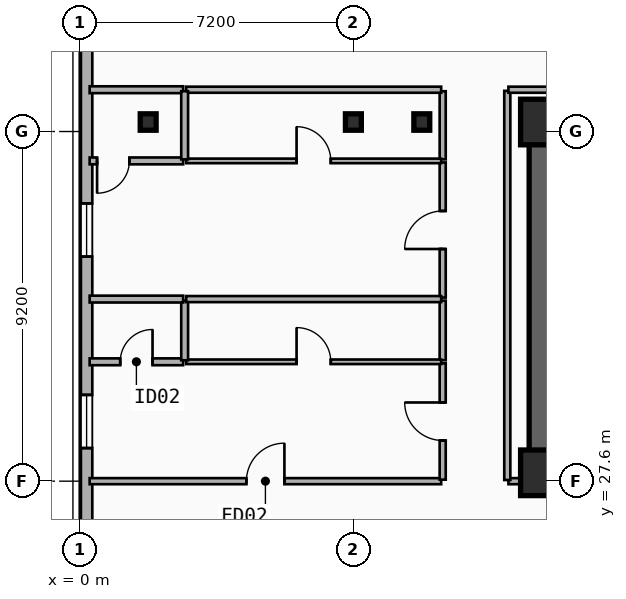
"""IFC4 building model, lengths in metres.
Left out: names, types, materials, properties, quantities, classifications, styles, units other than length and angle.
Written with IfcOpenShell. Run it as: python <this file> out.ifc"""

import sys

from ifc_helpers import new_model, si_unit, direction, frame, frame_2d, origin, origin_2d, place, context, subcontext, project, spatial, rectangle, i_section, extrude, element, fill, save


model = new_model("IFC4")
c1 = context("Model", 3, precision=1e-05, world=origin(), true_north=direction((0.0, 1.0)))
c2 = subcontext(c1, "Body", "Model", "MODEL_VIEW")
j1 = project(units=[si_unit("LENGTHUNIT", "METRE"), si_unit("PLANEANGLEUNIT", "RADIAN")], contexts=[c1])
p1 = place(None, origin())
s1 = spatial("IfcSite", under=j1, at=p1, CompositionType="ELEMENT")
p2 = place(p1, origin())
s2 = spatial("IfcBuilding", under=s1, at=p2, CompositionType="ELEMENT")
p3 = place(p2, frame((0.0, 0.0, 122.3)))
s3 = spatial("IfcBuildingStorey", under=s2, at=p3, CompositionType="ELEMENT", Elevation=122.3)
p4 = place(p3, frame((12.15, 37.05, 0.0), z_axis=(0.0, 0.0, 1.0), x_axis=(1.0, 0.0, 0.0)))
e1 = element("IfcWall", 1, at=p4, inside=s3, PredefinedType="SHEAR", context=c2, shape_type="SweptSolid", body=[
    extrude(rectangle(XDim=33.23, YDim=0.65, at=frame_2d((16.615, 0.0))), origin(), (0.0, 0.0, 1.0), 3.5),
])
p5 = place(p3, frame((21.18, 27.82, 0.0), z_axis=(0.0, 0.0, 1.0), x_axis=(-1.0, 0.0, 0.0)))
e2 = element("IfcWall", 2, at=p5, inside=s3, PredefinedType="SHEAR", context=c2, shape_type="SweptSolid", body=[
    extrude(rectangle(XDim=9.03, YDim=0.65, at=frame_2d((4.515, 0.0))), origin(), (0.0, 0.0, 1.0), 3.5),
])
p6 = place(p5, frame((2.68, 0.0, 0.0)))
e3 = element("IfcOpeningElement", 3, at=p6, cuts=e2, PredefinedType="OPENING", context=c2, shape_type="SweptSolid", body=[
    extrude(rectangle(XDim=1.1, YDim=2.15, at=frame_2d((0.55, 1.075))), frame((0.0, 0.335, 0.0), z_axis=(0.0, -1.0, 0.0), x_axis=(1.0, 0.0, 0.0)), (0.0, 0.0, 1.0), 0.67),
])
p7 = place(p3, frame((12.15, 28.145, 0.0), z_axis=(0.0, 0.0, 1.0), x_axis=(0.0, 1.0, 0.0)))
e4 = element("IfcWall", 4, at=p7, inside=s3, PredefinedType="SHEAR", context=c2, shape_type="SweptSolid", body=[
    extrude(rectangle(XDim=8.58, YDim=0.65, at=frame_2d((4.29, 0.0))), origin(), (0.0, 0.0, 1.0), 3.5),
])
for number, where, z_axis, x_axis in (
    (5, (12.2, 27.82, 0.0), (0.0, 0.0, 1.0), (1.0, 0.0, 0.0)),
    (6, (12.2, 37.05, 0.0), (0.0, 0.0, 1.0), (1.0, 0.0, 0.0)),
):
    element("IfcColumn", number, at=place(p3, frame(where, z_axis=z_axis, x_axis=x_axis)), inside=s3, PredefinedType="COLUMN", context=c2, shape_type="SweptSolid", body=[
        extrude(rectangle(XDim=1.2, YDim=1.2, at=origin_2d()), origin(), (0.0, 0.0, 1.0), 3.5),
    ])
for number, where, z_axis, x_axis in (
    (7, (9.0, 37.05, 0.0), (0.0, 0.0, 1.0), (1.0, 0.0, 0.0)),
    (8, (1.8, 37.05, 0.0), (0.0, 0.0, 1.0), (1.0, 0.0, 0.0)),
    (9, (7.2, 37.05, 0.0), (0.0, 0.0, 1.0), (1.0, 0.0, 0.0)),
):
    element("IfcColumn", number, at=place(p3, frame(where, z_axis=z_axis, x_axis=x_axis)), inside=s3, PredefinedType="COLUMN", context=c2, shape_type="SweptSolid", body=[
        extrude(i_section(OverallWidth=0.418, OverallDepth=0.432, WebThickness=0.035, FlangeThickness=0.056, FilletRadius=0.015, at=origin_2d()), origin(), (0.0, 0.0, 1.0), 3.5),
    ])
p8 = place(p3, frame((0.18, 21.0, 0.0), z_axis=(0.0, 0.0, 1.0), x_axis=(0.0, 1.0, 0.0)))
e10 = element("IfcWall", 10, at=p8, inside=s3, PredefinedType="SOLIDWALL", context=c2, shape_type="SweptSolid", body=[
    extrude(rectangle(XDim=18.0, YDim=0.3, at=frame_2d((9.0, 0.0))), origin(), (0.0, 0.0, 1.0), 3.24),
])
p9 = place(p8, frame((7.47, 0.0, 0.48)))
e11 = element("IfcOpeningElement", 11, at=p9, cuts=e10, PredefinedType="OPENING", context=c2, shape_type="SweptSolid", body=[
    extrude(rectangle(XDim=1.4, YDim=1.8, at=frame_2d((0.7, 0.9))), frame((0.0, 0.16, 0.0), z_axis=(0.0, -1.0, 0.0), x_axis=(1.0, 0.0, 0.0)), (0.0, 0.0, 1.0), 0.32),
])
p10 = place(p8, frame((12.509, 0.0, 0.48)))
e12 = element("IfcOpeningElement", 12, at=p10, cuts=e10, PredefinedType="OPENING", context=c2, shape_type="SweptSolid", body=[
    extrude(rectangle(XDim=1.4, YDim=1.8, at=frame_2d((0.7, 0.9))), frame((0.0, 0.16, 0.0), z_axis=(0.0, -1.0, 0.0), x_axis=(1.0, 0.0, 0.0)), (0.0, 0.0, 1.0), 0.32),
])
p11 = place(p8, frame((0.32, 0.0, 0.65)))
e13 = element("IfcOpeningElement", 13, at=p11, cuts=e10, PredefinedType="OPENING", context=c2, shape_type="SweptSolid", body=[
    extrude(rectangle(XDim=1.4, YDim=1.8, at=frame_2d((0.7, 0.9))), frame((0.0, 0.16, 0.0), z_axis=(0.0, -1.0, 0.0), x_axis=(1.0, 0.0, 0.0)), (0.0, 0.0, 1.0), 0.32),
])
p12 = place(p3, frame((0.26, 27.6, 0.0), z_axis=(0.0, 0.0, 1.0), x_axis=(1.0, 0.0, 0.0)))
e14 = element("IfcWall", 14, at=p12, inside=s3, PredefinedType="PARTITIONING", context=c2, shape_type="SweptSolid", body=[
    extrude(rectangle(XDim=9.25, YDim=0.16, at=frame_2d((4.625, 0.0))), origin(), (0.0, 0.0, 1.0), 2.57),
])
p13 = place(p12, frame((4.125, 0.0, 0.0)))
e15 = element("IfcOpeningElement", 15, at=p13, cuts=e14, PredefinedType="OPENING", context=c2, shape_type="SweptSolid", body=[
    extrude(rectangle(XDim=1.0, YDim=2.15, at=frame_2d((0.5, 1.075))), frame((0.0, 0.09, 0.0), z_axis=(0.0, -1.0, 0.0), x_axis=(1.0, 0.0, 0.0)), (0.0, 0.0, 1.0), 0.18),
])
p14 = place(p3, frame((9.55, 27.64, 0.0), z_axis=(0.0, 0.0, 1.0), x_axis=(0.0, 1.0, 0.0)))
e16 = element("IfcWall", 16, at=p14, inside=s3, PredefinedType="PARTITIONING", context=c2, shape_type="SweptSolid", body=[
    extrude(rectangle(XDim=3.061, YDim=0.16, at=frame_2d((1.531, 0.0))), origin(), (0.0, 0.0, 1.0), 3.24),
])
p15 = place(p14, frame((1.031, 0.0, 0.0)))
e17 = element("IfcOpeningElement", 17, at=p15, cuts=e16, PredefinedType="OPENING", context=c2, shape_type="SweptSolid", body=[
    extrude(rectangle(XDim=1.0, YDim=2.15, at=frame_2d((0.5, 1.075))), frame((0.0, 0.09, 0.0), z_axis=(0.0, -1.0, 0.0), x_axis=(1.0, 0.0, 0.0)), (0.0, 0.0, 1.0), 0.18),
])
p16 = place(p3, frame((9.55, 30.781, 0.0), z_axis=(0.0, 0.0, 1.0), x_axis=(0.0, 1.0, 0.0)))
e18 = element("IfcWall", 18, at=p16, inside=s3, PredefinedType="PARTITIONING", context=c2, shape_type="SweptSolid", body=[
    extrude(rectangle(XDim=1.57, YDim=0.16, at=frame_2d((0.785, 0.0))), origin(), (0.0, 0.0, 1.0), 3.24),
])
p17 = place(p3, frame((9.55, 32.431, 0.0), z_axis=(0.0, 0.0, 1.0), x_axis=(0.0, 1.0, 0.0)))
e19 = element("IfcWall", 19, at=p17, inside=s3, PredefinedType="PARTITIONING", context=c2, shape_type="SweptSolid", body=[
    extrude(rectangle(XDim=3.556, YDim=0.16, at=frame_2d((1.778, 0.0))), origin(), (0.0, 0.0, 1.0), 3.24),
])
p18 = place(p17, frame((1.278, 0.0, 0.0)))
e20 = element("IfcOpeningElement", 20, at=p18, cuts=e19, PredefinedType="OPENING", context=c2, shape_type="SweptSolid", body=[
    extrude(rectangle(XDim=1.0, YDim=2.15, at=frame_2d((0.5, 1.075))), frame((0.0, 0.09, 0.0), z_axis=(0.0, -1.0, 0.0), x_axis=(1.0, 0.0, 0.0)), (0.0, 0.0, 1.0), 0.18),
])
p19 = place(p3, frame((9.55, 36.067, 0.0), z_axis=(0.0, 0.0, 1.0), x_axis=(0.0, 1.0, 0.0)))
e21 = element("IfcWall", 21, at=p19, inside=s3, PredefinedType="PARTITIONING", context=c2, shape_type="SweptSolid", body=[
    extrude(rectangle(XDim=1.793, YDim=0.16, at=frame_2d((0.896, 0.0))), origin(), (0.0, 0.0, 1.0), 2.72),
])
p20 = place(p3, frame((0.26, 37.9, 0.0), z_axis=(0.0, 0.0, 1.0), x_axis=(1.0, 0.0, 0.0)))
e22 = element("IfcWall", 22, at=p20, inside=s3, PredefinedType="PLUMBINGWALL", context=c2, shape_type="SweptSolid", body=[
    extrude(rectangle(XDim=2.46, YDim=0.18, at=frame_2d((1.23, 0.0))), origin(), (0.0, 0.0, 1.0), 3.24),
])
p21 = place(p3, frame((2.8, 37.9, 0.0), z_axis=(0.0, 0.0, 1.0), x_axis=(1.0, 0.0, 0.0)))
e23 = element("IfcWall", 23, at=p21, inside=s3, PredefinedType="PARTITIONING", context=c2, shape_type="SweptSolid", body=[
    extrude(rectangle(XDim=6.71, YDim=0.16, at=frame_2d((3.355, 0.0))), origin(), (0.0, 0.0, 1.0), 3.24),
])
p22 = place(p3, frame((0.26, 30.741, 0.0), z_axis=(0.0, 0.0, 1.0), x_axis=(1.0, 0.0, 0.0)))
e24 = element("IfcWall", 24, at=p22, inside=s3, PredefinedType="PLUMBINGWALL", context=c2, shape_type="SweptSolid", body=[
    extrude(rectangle(XDim=2.46, YDim=0.18, at=frame_2d((1.23, 0.0))), origin(), (0.0, 0.0, 1.0), 2.57),
])
p23 = place(p22, frame((0.805, 0.0, 0.0)))
e25 = element("IfcOpeningElement", 25, at=p23, cuts=e24, PredefinedType="OPENING", context=c2, shape_type="SweptSolid", body=[
    extrude(rectangle(XDim=0.85, YDim=2.1, at=frame_2d((0.425, 1.05))), frame((0.0, 0.1, 0.0), z_axis=(0.0, -1.0, 0.0), x_axis=(1.0, 0.0, 0.0)), (0.0, 0.0, 1.0), 0.2),
])
p24 = place(p3, frame((2.8, 30.741, 0.0), z_axis=(0.0, 0.0, 1.0), x_axis=(1.0, 0.0, 0.0)))
e26 = element("IfcWall", 26, at=p24, inside=s3, PredefinedType="PARTITIONING", context=c2, shape_type="SweptSolid", body=[
    extrude(rectangle(XDim=6.71, YDim=0.12, at=frame_2d((3.355, 0.0))), origin(), (0.0, 0.0, 1.0), 2.57),
])
p25 = place(p24, frame((2.905, 0.0, 0.0)))
e27 = element("IfcOpeningElement", 27, at=p25, cuts=e26, PredefinedType="OPENING", context=c2, shape_type="SweptSolid", body=[
    extrude(rectangle(XDim=0.9, YDim=2.1, at=frame_2d((0.45, 1.05))), frame((0.0, 0.07, 0.0), z_axis=(0.0, -1.0, 0.0), x_axis=(1.0, 0.0, 0.0)), (0.0, 0.0, 1.0), 0.14),
])
p26 = place(p3, frame((2.76, 30.781, 0.0), z_axis=(0.0, 0.0, 1.0), x_axis=(0.0, 1.0, 0.0)))
e28 = element("IfcWall", 28, at=p26, inside=s3, PredefinedType="PLUMBINGWALL", context=c2, shape_type="SweptSolid", body=[
    extrude(rectangle(XDim=1.57, YDim=0.18, at=frame_2d((0.785, 0.0))), origin(), (0.0, 0.0, 1.0), 3.24),
])
p27 = place(p3, frame((0.26, 32.391, 0.0), z_axis=(0.0, 0.0, 1.0), x_axis=(1.0, 0.0, 0.0)))
e29 = element("IfcWall", 29, at=p27, inside=s3, PredefinedType="PLUMBINGWALL", context=c2, shape_type="SweptSolid", body=[
    extrude(rectangle(XDim=2.46, YDim=0.18, at=frame_2d((1.23, 0.0))), origin(), (0.0, 0.0, 1.0), 2.57),
])
p28 = place(p3, frame((2.8, 32.391, 0.0), z_axis=(0.0, 0.0, 1.0), x_axis=(1.0, 0.0, 0.0)))
e30 = element("IfcWall", 30, at=p28, inside=s3, PredefinedType="PARTITIONING", context=c2, shape_type="SweptSolid", body=[
    extrude(rectangle(XDim=6.71, YDim=0.16, at=frame_2d((3.355, 0.0))), origin(), (0.0, 0.0, 1.0), 2.57),
])
p29 = place(p3, frame((2.72, 36.027, 0.0), z_axis=(0.0, 0.0, 1.0), x_axis=(-1.0, 0.0, 0.0)))
e31 = element("IfcWall", 31, at=p29, inside=s3, PredefinedType="PLUMBINGWALL", context=c2, shape_type="SweptSolid", body=[
    extrude(rectangle(XDim=2.46, YDim=0.18, at=frame_2d((1.23, 0.0))), origin(), (0.0, 0.0, 1.0), 2.57),
])
p30 = place(p29, frame((1.415, 0.0, 0.0)))
e32 = element("IfcOpeningElement", 32, at=p30, cuts=e31, PredefinedType="OPENING", context=c2, shape_type="SweptSolid", body=[
    extrude(rectangle(XDim=0.85, YDim=2.1, at=frame_2d((0.425, 1.05))), frame((0.0, 0.1, 0.0), z_axis=(0.0, -1.0, 0.0), x_axis=(1.0, 0.0, 0.0)), (0.0, 0.0, 1.0), 0.2),
])
p31 = place(p3, frame((2.8, 36.027, 0.0), z_axis=(0.0, 0.0, 1.0), x_axis=(1.0, 0.0, 0.0)))
e33 = element("IfcWall", 33, at=p31, inside=s3, PredefinedType="PARTITIONING", context=c2, shape_type="SweptSolid", body=[
    extrude(rectangle(XDim=6.71, YDim=0.12, at=frame_2d((3.355, 0.0))), origin(), (0.0, 0.0, 1.0), 2.57),
])
p32 = place(p31, frame((2.905, 0.0, 0.0)))
e34 = element("IfcOpeningElement", 34, at=p32, cuts=e33, PredefinedType="OPENING", context=c2, shape_type="SweptSolid", body=[
    extrude(rectangle(XDim=0.9, YDim=2.1, at=frame_2d((0.45, 1.05))), frame((0.0, 0.07, 0.0), z_axis=(0.0, -1.0, 0.0), x_axis=(1.0, 0.0, 0.0)), (0.0, 0.0, 1.0), 0.14),
])
p33 = place(p3, frame((2.76, 36.067, 0.0), z_axis=(0.0, 0.0, 1.0), x_axis=(0.0, 1.0, 0.0)))
e35 = element("IfcWall", 35, at=p33, inside=s3, PredefinedType="PLUMBINGWALL", context=c2, shape_type="SweptSolid", body=[
    extrude(rectangle(XDim=1.793, YDim=0.18, at=frame_2d((0.896, 0.0))), origin(), (0.0, 0.0, 1.0), 2.72),
])
p34 = place(p3, frame((11.28, 27.6, 0.0), z_axis=(0.0, 0.0, 1.0), x_axis=(1.0, 0.0, 0.0)))
e36 = element("IfcWall", 36, at=p34, inside=s3, PredefinedType="PARTITIONING", context=c2, shape_type="SweptSolid", body=[
    extrude(rectangle(XDim=0.84, YDim=0.16, at=frame_2d((0.42, 0.0))), origin(), (0.0, 0.0, 1.0), 2.28),
])
p35 = place(p3, frame((11.25, 27.63, 0.0), z_axis=(0.0, 0.0, 1.0), x_axis=(0.0, 1.0, 0.0)))
e37 = element("IfcWall", 37, at=p35, inside=s3, PredefinedType="PARTITIONING", context=c2, shape_type="SweptSolid", body=[
    extrude(rectangle(XDim=10.24, YDim=0.16, at=frame_2d((5.12, 0.0))), origin(), (0.0, 0.0, 1.0), 2.72),
])
p36 = place(p3, frame((11.28, 37.9, 0.0), z_axis=(0.0, 0.0, 1.0), x_axis=(1.0, 0.0, 0.0)))
e38 = element("IfcWall", 38, at=p36, inside=s3, PredefinedType="PARTITIONING", context=c2, shape_type="SweptSolid", body=[
    extrude(rectangle(XDim=35.04, YDim=0.16, at=frame_2d((17.52, 0.0))), origin(), (0.0, 0.0, 1.0), 3.24),
])
p37 = place(p9, origin())
e39 = element("IfcWindow", 39, at=p37, inside=s3, PartitioningType="SINGLE_PANEL", PredefinedType="WINDOW", context=c2, shape_type="SweptSolid", body=[
    extrude(rectangle(XDim=1.4, YDim=1.8, at=frame_2d((0.7, 0.9))), frame((0.0, 0.03, 0.0), z_axis=(0.0, -1.0, 0.0), x_axis=(1.0, 0.0, 0.0)), (0.0, 0.0, 1.0), 0.06),
])
fill(e11, e39)
p38 = place(p10, origin())
e40 = element("IfcWindow", 40, at=p38, inside=s3, PartitioningType="SINGLE_PANEL", PredefinedType="WINDOW", context=c2, shape_type="SweptSolid", body=[
    extrude(rectangle(XDim=1.4, YDim=1.8, at=frame_2d((0.7, 0.9))), frame((0.0, 0.03, 0.0), z_axis=(0.0, -1.0, 0.0), x_axis=(1.0, 0.0, 0.0)), (0.0, 0.0, 1.0), 0.06),
])
fill(e12, e40)
p39 = place(p13, origin())
e41 = element("IfcDoor", 41, at=p39, inside=s3, OperationType="SINGLE_SWING_RIGHT", PredefinedType="DOOR", context=c2, shape_type="SweptSolid", body=[
    extrude(rectangle(XDim=1.0, YDim=2.15, at=frame_2d((0.5, 1.075))), frame((0.0, 0.025, 0.0), z_axis=(0.0, -1.0, 0.0), x_axis=(1.0, 0.0, 0.0)), (0.0, 0.0, 1.0), 0.05),
])
fill(e15, e41)
p40 = place(p15, origin())
e42 = element("IfcDoor", 42, at=p40, inside=s3, OperationType="SINGLE_SWING_RIGHT", PredefinedType="DOOR", context=c2, shape_type="SweptSolid", body=[
    extrude(rectangle(XDim=1.0, YDim=2.15, at=frame_2d((0.5, 1.075))), frame((0.0, 0.025, 0.0), z_axis=(0.0, -1.0, 0.0), x_axis=(1.0, 0.0, 0.0)), (0.0, 0.0, 1.0), 0.05),
])
fill(e17, e42)
p41 = place(p18, origin())
e43 = element("IfcDoor", 43, at=p41, inside=s3, OperationType="SINGLE_SWING_LEFT", PredefinedType="DOOR", context=c2, shape_type="SweptSolid", body=[
    extrude(rectangle(XDim=1.0, YDim=2.15, at=frame_2d((0.5, 1.075))), frame((0.0, 0.025, 0.0), z_axis=(0.0, -1.0, 0.0), x_axis=(1.0, 0.0, 0.0)), (0.0, 0.0, 1.0), 0.05),
])
fill(e20, e43)
p42 = place(p23, origin())
e44 = element("IfcDoor", 44, at=p42, inside=s3, OperationType="SINGLE_SWING_RIGHT", PredefinedType="DOOR", context=c2, shape_type="SweptSolid", body=[
    extrude(rectangle(XDim=0.85, YDim=2.1, at=frame_2d((0.425, 1.05))), frame((0.0, 0.025, 0.0), z_axis=(0.0, -1.0, 0.0), x_axis=(1.0, 0.0, 0.0)), (0.0, 0.0, 1.0), 0.05),
])
fill(e25, e44)
p43 = place(p25, origin())
e45 = element("IfcDoor", 45, at=p43, inside=s3, OperationType="SINGLE_SWING_LEFT", PredefinedType="DOOR", context=c2, shape_type="SweptSolid", body=[
    extrude(rectangle(XDim=0.9, YDim=2.1, at=frame_2d((0.45, 1.05))), frame((0.0, 0.025, 0.0), z_axis=(0.0, -1.0, 0.0), x_axis=(1.0, 0.0, 0.0)), (0.0, 0.0, 1.0), 0.05),
])
fill(e27, e45)
p44 = place(p30, origin())
e46 = element("IfcDoor", 46, at=p44, inside=s3, OperationType="SINGLE_SWING_RIGHT", PredefinedType="DOOR", context=c2, shape_type="SweptSolid", body=[
    extrude(rectangle(XDim=0.85, YDim=2.1, at=frame_2d((0.425, 1.05))), frame((0.0, 0.025, 0.0), z_axis=(0.0, -1.0, 0.0), x_axis=(1.0, 0.0, 0.0)), (0.0, 0.0, 1.0), 0.05),
])
fill(e32, e46)
p45 = place(p32, origin())
e47 = element("IfcDoor", 47, at=p45, inside=s3, OperationType="SINGLE_SWING_LEFT", PredefinedType="DOOR", context=c2, shape_type="SweptSolid", body=[
    extrude(rectangle(XDim=0.9, YDim=2.1, at=frame_2d((0.45, 1.05))), frame((0.0, 0.025, 0.0), z_axis=(0.0, -1.0, 0.0), x_axis=(1.0, 0.0, 0.0)), (0.0, 0.0, 1.0), 0.05),
])
fill(e34, e47)
save(model, sys.argv[1])
